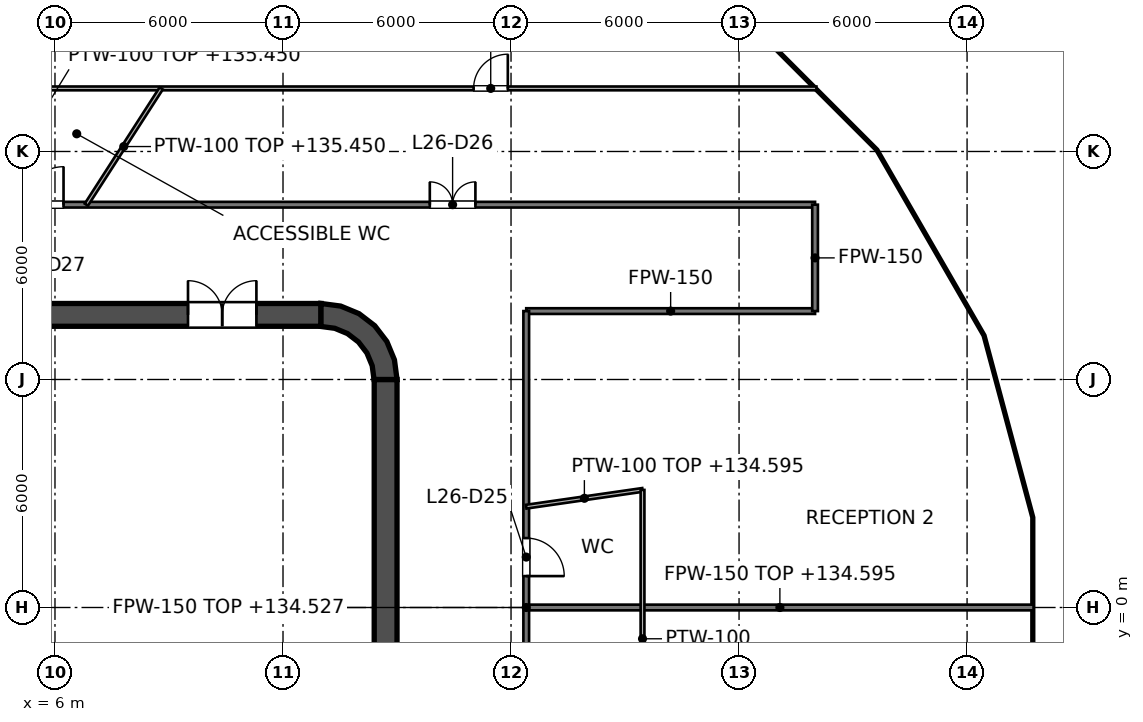
"""IFC4 building model, lengths in metres.
Left out: names, types, materials, properties, quantities, classifications, styles, units other than length and angle.
Written with IfcOpenShell. Run it as: python <this file> out.ifc"""

import sys

from ifc_helpers import new_model, si_unit, direction, frame, frame_2d, origin, place, context, subcontext, project, spatial, polyline, rectangle, outline, extrude, element, fill, save


model = new_model("IFC4")
c1 = context("Model", 3, precision=1e-05, world=origin(), true_north=direction((0.0, 1.0)))
c2 = subcontext(c1, "Body", "Model", "MODEL_VIEW")
j1 = project(units=[si_unit("LENGTHUNIT", "METRE"), si_unit("PLANEANGLEUNIT", "RADIAN")], contexts=[c1])
p1 = place(None, origin())
s1 = spatial("IfcSite", under=j1, at=p1, CompositionType="ELEMENT")
p2 = place(p1, origin())
s2 = spatial("IfcBuilding", under=s1, at=p2, CompositionType="ELEMENT")
p3 = place(p2, frame((0.0, 0.0, 131.4)))
s3 = spatial("IfcBuildingStorey", under=s2, at=p3, CompositionType="ELEMENT", Elevation=131.4)
p4 = place(p3, frame((-13.0, 7.7, 0.0), z_axis=(0.0, 0.0, 1.0), x_axis=(1.0, 0.0, 0.0)))
e1 = element("IfcWall", 1, at=p4, inside=s3, PredefinedType="SHEAR", context=c2, shape_type="SweptSolid", body=[
    extrude(rectangle(XDim=26.0, YDim=0.6, at=frame_2d((13.0, 0.0))), origin(), (0.0, 0.0, 1.0), 4.2),
])
p5 = place(p4, frame((1.7, 0.0, 0.0)))
e2 = element("IfcOpeningElement", 2, at=p5, cuts=e1, PredefinedType="OPENING", context=c2, shape_type="SweptSolid", body=[
    extrude(rectangle(XDim=1.8, YDim=2.1, at=frame_2d((0.9, 1.05))), frame((0.0, 0.3, 0.0), z_axis=(0.0, -1.0, 0.0), x_axis=(1.0, 0.0, 0.0)), (0.0, 0.0, 1.0), 0.6),
])
p6 = place(p4, frame((22.5, 0.0, 0.0)))
e3 = element("IfcOpeningElement", 3, at=p6, cuts=e1, PredefinedType="OPENING", context=c2, shape_type="SweptSolid", body=[
    extrude(rectangle(XDim=1.8, YDim=2.1, at=frame_2d((0.9, 1.05))), frame((0.0, 0.3, 0.0), z_axis=(0.0, -1.0, 0.0), x_axis=(1.0, 0.0, 0.0)), (0.0, 0.0, 1.0), 0.6),
])
p7 = place(p3, frame((14.7, -6.0, 0.0), z_axis=(0.0, 0.0, 1.0), x_axis=(0.0, 1.0, 0.0)))
e4 = element("IfcWall", 4, at=p7, inside=s3, PredefinedType="SHEAR", context=c2, shape_type="SweptSolid", body=[
    extrude(rectangle(XDim=12.0, YDim=0.6, at=frame_2d((6.0, 0.0))), origin(), (0.0, 0.0, 1.0), 4.2),
])
p8 = place(p3, origin())
e5 = element("IfcWall", 5, at=p8, inside=s3, PredefinedType="SHEAR", context=c2, shape_type="SweptSolid", body=[
    extrude(outline(polyline([(13.0, 8.0), (13.0, 7.395), (13.361, 7.347), (13.698, 7.208), (13.986, 6.986), (14.208, 6.698), (14.347, 6.361), (14.395, 6.0), (15.0, 6.0), (14.932, 6.518), (14.732, 7.0), (14.414, 7.414), (14.0, 7.732), (13.518, 7.932), (13.0, 8.0)])), origin(), (0.0, 0.0, 1.0), 4.2),
])
p9 = place(p3, frame((9.0, 4.1, 0.0), z_axis=(0.0, 0.0, 1.0), x_axis=(0.0, 1.0, 0.0)))
e6 = element("IfcWall", 6, at=p9, inside=s3, PredefinedType="SOLIDWALL", context=c2, shape_type="SweptSolid", body=[
    extrude(rectangle(XDim=2.5, YDim=0.25, at=frame_2d((1.25, 0.0))), origin(), (0.0, 0.0, 1.0), 4.05),
])
p10 = place(p9, frame((0.65, 0.0, 0.0)))
e7 = element("IfcOpeningElement", 7, at=p10, cuts=e6, PredefinedType="OPENING", context=c2, shape_type="SweptSolid", body=[
    extrude(rectangle(XDim=1.2, YDim=2.1, at=frame_2d((0.6, 1.05))), frame((0.0, 0.125, 0.0), z_axis=(0.0, -1.0, 0.0), x_axis=(1.0, 0.0, 0.0)), (0.0, 0.0, 1.0), 0.25),
])
p11 = place(p3, frame((-9.125, 7.0, 0.0), z_axis=(0.0, 0.0, 1.0), x_axis=(1.0, 0.0, 0.0)))
e8 = element("IfcWall", 8, at=p11, inside=s3, PredefinedType="SOLIDWALL", context=c2, shape_type="SweptSolid", body=[
    extrude(rectangle(XDim=18.25, YDim=0.8, at=frame_2d((9.125, 0.0))), origin(), (0.0, 0.0, 1.0), 4.05),
])
p12 = place(p3, frame((0.775, 1.525, 0.0), z_axis=(0.0, 0.0, 1.0), x_axis=(1.0, 0.0, 0.0)))
e9 = element("IfcWall", 9, at=p12, inside=s3, PredefinedType="PARTITIONING", context=c2, shape_type="SweptSolid", body=[
    extrude(rectangle(XDim=8.35, YDim=0.25, at=frame_2d((4.175, 0.0))), origin(), (0.0, 0.0, 1.0), 4.05),
])
p13 = place(p12, frame((1.413, 0.0, 0.0)))
e10 = element("IfcOpeningElement", 10, at=p13, cuts=e9, PredefinedType="OPENING", context=c2, shape_type="SweptSolid", body=[
    extrude(rectangle(XDim=1.0, YDim=2.1, at=frame_2d((0.5, 1.05))), frame((0.0, 0.125, 0.0), z_axis=(0.0, -1.0, 0.0), x_axis=(1.0, 0.0, 0.0)), (0.0, 0.0, 1.0), 0.25),
])
p14 = place(p12, frame((5.387, 0.0, 0.0)))
e11 = element("IfcOpeningElement", 11, at=p14, cuts=e9, PredefinedType="OPENING", context=c2, shape_type="SweptSolid", body=[
    extrude(rectangle(XDim=1.0, YDim=2.1, at=frame_2d((0.5, 1.05))), frame((0.0, 0.125, 0.0), z_axis=(0.0, -1.0, 0.0), x_axis=(1.0, 0.0, 0.0)), (0.0, 0.0, 1.0), 0.25),
])
p15 = place(p3, frame((0.775, 3.975, 0.0), z_axis=(0.0, 0.0, 1.0), x_axis=(1.0, 0.0, 0.0)))
e12 = element("IfcWall", 12, at=p15, inside=s3, PredefinedType="SOLIDWALL", context=c2, shape_type="SweptSolid", body=[
    extrude(rectangle(XDim=8.35, YDim=0.25, at=frame_2d((4.175, 0.0))), origin(), (0.0, 0.0, 1.0), 4.05),
])
p16 = place(p3, frame((9.0, 1.65, 0.0), z_axis=(0.0, 0.0, 1.0), x_axis=(0.0, 1.0, 0.0)))
e13 = element("IfcWall", 13, at=p16, inside=s3, PredefinedType="PARTITIONING", context=c2, shape_type="SweptSolid", body=[
    extrude(rectangle(XDim=2.2, YDim=0.25, at=frame_2d((1.1, 0.0))), origin(), (0.0, 0.0, 1.0), 4.05),
])
p17 = place(p3, frame((11.8, -7.4, 0.0), z_axis=(0.0, 0.0, 1.0), x_axis=(0.0, 1.0, 0.0)))
e14 = element("IfcWall", 14, at=p17, inside=s3, PredefinedType="SOLIDWALL", context=c2, shape_type="SweptSolid", body=[
    extrude(rectangle(XDim=14.8, YDim=0.4, at=frame_2d((7.4, 0.0))), origin(), (0.0, 0.0, 1.0), 4.05),
])
p18 = place(p17, frame((11.2, 0.0, 0.0)))
e15 = element("IfcOpeningElement", 15, at=p18, cuts=e14, PredefinedType="OPENING", context=c2, shape_type="SweptSolid", body=[
    extrude(rectangle(XDim=1.1, YDim=2.1, at=frame_2d((0.55, 1.05))), frame((0.0, 0.2, 0.0), z_axis=(0.0, -1.0, 0.0), x_axis=(1.0, 0.0, 0.0)), (0.0, 0.0, 1.0), 0.4),
])
p19 = place(p17, frame((8.3, 0.0, 0.0)))
e16 = element("IfcOpeningElement", 16, at=p19, cuts=e14, PredefinedType="OPENING", context=c2, shape_type="SweptSolid", body=[
    extrude(rectangle(XDim=1.1, YDim=2.1, at=frame_2d((0.55, 1.05))), frame((0.0, 0.2, 0.0), z_axis=(0.0, -1.0, 0.0), x_axis=(1.0, 0.0, 0.0)), (0.0, 0.0, 1.0), 0.4),
])
p20 = place(p17, frame((5.4, 0.0, 0.0)))
e17 = element("IfcOpeningElement", 17, at=p20, cuts=e14, PredefinedType="OPENING", context=c2, shape_type="SweptSolid", body=[
    extrude(rectangle(XDim=1.1, YDim=2.1, at=frame_2d((0.55, 1.05))), frame((0.0, 0.2, 0.0), z_axis=(0.0, -1.0, 0.0), x_axis=(1.0, 0.0, 0.0)), (0.0, 0.0, 1.0), 0.4),
])
p21 = place(p17, frame((13.552, 0.0, 0.0)))
e18 = element("IfcOpeningElement", 18, at=p21, cuts=e14, PredefinedType="OPENING", context=c2, shape_type="SweptSolid", body=[
    extrude(rectangle(XDim=0.9, YDim=2.1, at=frame_2d((0.45, 1.05))), frame((0.0, 0.2, 0.0), z_axis=(0.0, -1.0, 0.0), x_axis=(1.0, 0.0, 0.0)), (0.0, 0.0, 1.0), 0.4),
])
p22 = place(p17, frame((0.347, 0.0, 0.0)))
e19 = element("IfcOpeningElement", 19, at=p22, cuts=e14, PredefinedType="OPENING", context=c2, shape_type="SweptSolid", body=[
    extrude(rectangle(XDim=0.9, YDim=2.1, at=frame_2d((0.45, 1.05))), frame((0.0, 0.2, 0.0), z_axis=(0.0, -1.0, 0.0), x_axis=(1.0, 0.0, 0.0)), (0.0, 0.0, 1.0), 0.4),
])
e20 = element("IfcWall", 20, at=p8, inside=s3, PredefinedType="SOLIDWALL", context=c2, shape_type="SweptSolid", body=[
    extrude(outline(polyline([(12.0, -5.675), (12.0, -5.925), (14.15, -5.925), (14.4, -5.925), (14.4, -5.675), (14.4, -3.025), (14.4, -2.775), (14.4, -0.125), (14.4, 0.125), (14.4, 2.775), (14.4, 3.025), (14.4, 5.675), (14.4, 5.925), (14.15, 5.925), (12.0, 5.925), (12.0, 5.675), (14.15, 5.675), (14.15, 3.025), (12.0, 3.025), (12.0, 2.775), (14.15, 2.775), (14.15, 0.125), (12.0, 0.125), (12.0, -0.125), (14.15, -0.125), (14.15, -2.775), (12.0, -2.775), (12.0, -3.025), (14.15, -3.025), (14.15, -5.675), (12.0, -5.675)])), origin(), (0.0, 0.0, 1.0), 4.05),
])
p23 = place(p3, frame((18.4, 0.0, 0.0), z_axis=(0.0, 0.0, 1.0), x_axis=(1.0, 0.0, 0.0)))
e21 = element("IfcWall", 21, at=p23, inside=s3, PredefinedType="PARTITIONING", context=c2, shape_type="SweptSolid", body=[
    extrude(rectangle(XDim=13.349, YDim=0.15, at=frame_2d((6.675, 0.0))), origin(), (0.0, 0.0, 1.0), 3.195),
])
p24 = place(p3, frame((18.4, 7.8, 0.0), z_axis=(0.0, 0.0, 1.0), x_axis=(1.0, 0.0, 0.0)))
e22 = element("IfcWall", 22, at=p24, inside=s3, PredefinedType="PARTITIONING", context=c2, shape_type="SweptSolid", body=[
    extrude(rectangle(XDim=7.6, YDim=0.15, at=frame_2d((3.8, 0.0))), origin(), (0.0, 0.0, 1.0), 3.276),
])
p25 = place(p3, frame((-26.0, 10.6, 0.0), z_axis=(0.0, 0.0, 1.0), x_axis=(1.0, 0.0, 0.0)))
e23 = element("IfcWall", 23, at=p25, inside=s3, PredefinedType="PARTITIONING", context=c2, shape_type="SweptSolid", body=[
    extrude(rectangle(XDim=52.0, YDim=0.15, at=frame_2d((26.0, 0.0))), origin(), (0.0, 0.0, 1.0), 3.127),
])
p26 = place(p25, frame((41.863, 0.0, 0.0)))
e24 = element("IfcOpeningElement", 24, at=p26, cuts=e23, PredefinedType="OPENING", context=c2, shape_type="SweptSolid", body=[
    extrude(rectangle(XDim=1.2, YDim=2.1, at=frame_2d((0.6, 1.05))), frame((0.0, 0.075, 0.0), z_axis=(0.0, -1.0, 0.0), x_axis=(1.0, 0.0, 0.0)), (0.0, 0.0, 1.0), 0.15),
])
p27 = place(p25, frame((31.225, 0.0, 0.0)))
e25 = element("IfcOpeningElement", 25, at=p27, cuts=e23, PredefinedType="OPENING", context=c2, shape_type="SweptSolid", body=[
    extrude(rectangle(XDim=1.0, YDim=2.1, at=frame_2d((0.5, 1.05))), frame((0.0, 0.075, 0.0), z_axis=(0.0, -1.0, 0.0), x_axis=(1.0, 0.0, 0.0)), (0.0, 0.0, 1.0), 0.15),
])
p28 = place(p25, frame((29.234, 0.0, 0.0)))
e26 = element("IfcOpeningElement", 26, at=p28, cuts=e23, PredefinedType="OPENING", context=c2, shape_type="SweptSolid", body=[
    extrude(rectangle(XDim=1.0, YDim=2.1, at=frame_2d((0.5, 1.05))), frame((0.0, 0.075, 0.0), z_axis=(0.0, -1.0, 0.0), x_axis=(1.0, 0.0, 0.0)), (0.0, 0.0, 1.0), 0.15),
])
p29 = place(p25, frame((25.5, 0.0, 0.0)))
e27 = element("IfcOpeningElement", 27, at=p29, cuts=e23, PredefinedType="OPENING", context=c2, shape_type="SweptSolid", body=[
    extrude(rectangle(XDim=1.0, YDim=2.1, at=frame_2d((0.5, 1.05))), frame((0.0, 0.075, 0.0), z_axis=(0.0, -1.0, 0.0), x_axis=(1.0, 0.0, 0.0)), (0.0, 0.0, 1.0), 0.15),
])
p30 = place(p25, frame((14.83, 0.0, 0.0)))
e28 = element("IfcOpeningElement", 28, at=p30, cuts=e23, PredefinedType="OPENING", context=c2, shape_type="SweptSolid", body=[
    extrude(rectangle(XDim=1.0, YDim=2.1, at=frame_2d((0.5, 1.05))), frame((0.0, 0.075, 0.0), z_axis=(0.0, -1.0, 0.0), x_axis=(1.0, 0.0, 0.0)), (0.0, 0.0, 1.0), 0.15),
])
p31 = place(p25, frame((3.249, 0.0, 0.0)))
e29 = element("IfcOpeningElement", 29, at=p31, cuts=e23, PredefinedType="OPENING", context=c2, shape_type="SweptSolid", body=[
    extrude(rectangle(XDim=1.0, YDim=2.1, at=frame_2d((0.5, 1.05))), frame((0.0, 0.075, 0.0), z_axis=(0.0, -1.0, 0.0), x_axis=(1.0, 0.0, 0.0)), (0.0, 0.0, 1.0), 0.15),
])
p32 = place(p3, frame((2.84, 10.6, 0.0), z_axis=(0.0, 0.0, 1.0), x_axis=(0.258833974298, 0.9659218259, 0.0)))
e30 = element("IfcWall", 30, at=p32, inside=s3, PredefinedType="PARTITIONING", context=c2, shape_type="SweptSolid", body=[
    extrude(rectangle(XDim=13.464, YDim=0.15, at=frame_2d((6.732, 0.0))), origin(), (0.0, 0.0, 1.0), 3.502),
])
p33 = place(p3, frame((26.0, 7.8, 0.0), z_axis=(0.0, 0.0, 1.0), x_axis=(0.0, 1.0, 0.0)))
e31 = element("IfcWall", 31, at=p33, inside=s3, PredefinedType="PARTITIONING", context=c2, shape_type="SweptSolid", body=[
    extrude(rectangle(XDim=2.8, YDim=0.15, at=frame_2d((1.4, 0.0))), origin(), (0.0, 0.0, 1.0), 3.276),
])
p34 = place(p3, frame((18.4, -7.8, 0.0), z_axis=(0.0, 0.0, 1.0), x_axis=(0.0, 1.0, 0.0)))
e32 = element("IfcWall", 32, at=p34, inside=s3, PredefinedType="PARTITIONING", context=c2, shape_type="SweptSolid", body=[
    extrude(rectangle(XDim=15.6, YDim=0.15, at=frame_2d((7.8, 0.0))), origin(), (0.0, 0.0, 1.0), 3.127),
])
p35 = place(p34, frame((8.626, 0.0, 0.0)))
e33 = element("IfcOpeningElement", 33, at=p35, cuts=e32, PredefinedType="OPENING", context=c2, shape_type="SweptSolid", body=[
    extrude(rectangle(XDim=1.0, YDim=2.1, at=frame_2d((0.5, 1.05))), frame((0.0, 0.075, 0.0), z_axis=(0.0, -1.0, 0.0), x_axis=(1.0, 0.0, 0.0)), (0.0, 0.0, 1.0), 0.15),
])
p36 = place(p3, frame((-23.659, 13.66, 0.0), z_axis=(0.0, 0.0, 1.0), x_axis=(1.0, 0.0, 0.0)))
e34 = element("IfcWall", 34, at=p36, inside=s3, PredefinedType="PARTITIONING", context=c2, shape_type="SweptSolid", body=[
    extrude(rectangle(XDim=49.695, YDim=0.1, at=frame_2d((24.847, 0.0))), origin(), (0.0, 0.0, 1.0), 3.127),
])
p37 = place(p36, frame((40.675, 0.0, 0.0)))
e35 = element("IfcOpeningElement", 35, at=p37, cuts=e34, PredefinedType="OPENING", context=c2, shape_type="SweptSolid", body=[
    extrude(rectangle(XDim=0.9, YDim=2.1, at=frame_2d((0.45, 1.05))), frame((0.0, 0.05, 0.0), z_axis=(0.0, -1.0, 0.0), x_axis=(1.0, 0.0, 0.0)), (0.0, 0.0, 1.0), 0.1),
])
p38 = place(p36, frame((9.049, 0.0, 0.0)))
e36 = element("IfcOpeningElement", 36, at=p38, cuts=e34, PredefinedType="OPENING", context=c2, shape_type="SweptSolid", body=[
    extrude(rectangle(XDim=1.8, YDim=2.1, at=frame_2d((0.9, 1.05))), frame((0.0, 0.05, 0.0), z_axis=(0.0, -1.0, 0.0), x_axis=(1.0, 0.0, 0.0)), (0.0, 0.0, 1.0), 0.1),
])
p39 = place(p3, frame((18.4, 2.653, 0.0), z_axis=(0.0, 0.0, 1.0), x_axis=(0.989778203896, 0.142615241442, 0.0)))
e37 = element("IfcWall", 37, at=p39, inside=s3, PredefinedType="PARTITIONING", context=c2, shape_type="SweptSolid", body=[
    extrude(rectangle(XDim=3.092, YDim=0.1, at=frame_2d((1.546, 0.0))), origin(), (0.0, 0.0, 1.0), 3.195),
])
p40 = place(p3, frame((6.825, 10.6, 0.0), z_axis=(0.0, 0.0, 1.0), x_axis=(0.541330496355, 0.840809903436, 0.0)))
e38 = element("IfcWall", 38, at=p40, inside=s3, PredefinedType="PARTITIONING", context=c2, shape_type="SweptSolid", body=[
    extrude(rectangle(XDim=3.639, YDim=0.1, at=frame_2d((1.82, 0.0))), origin(), (0.0, 0.0, 1.0), 4.05),
])
p41 = place(p3, frame((21.46, -4.74, 0.0), z_axis=(0.0, 0.0, 1.0), x_axis=(0.0, 1.0, 0.0)))
e39 = element("IfcWall", 39, at=p41, inside=s3, PredefinedType="PARTITIONING", context=c2, shape_type="SweptSolid", body=[
    extrude(rectangle(XDim=7.834, YDim=0.1, at=frame_2d((3.917, 0.0))), origin(), (0.0, 0.0, 1.0), 3.127),
])
p42 = place(p18, origin())
e40 = element("IfcDoor", 40, at=p42, inside=s3, OperationType="DOUBLE_DOOR_SLIDING", PredefinedType="DOOR", context=c2, shape_type="SweptSolid", body=[
    extrude(rectangle(XDim=1.1, YDim=2.1, at=frame_2d((0.55, 1.05))), frame((0.0, 0.025, 0.0), z_axis=(0.0, -1.0, 0.0), x_axis=(1.0, 0.0, 0.0)), (0.0, 0.0, 1.0), 0.05),
])
fill(e15, e40)
p43 = place(p19, origin())
e41 = element("IfcDoor", 41, at=p43, inside=s3, OperationType="DOUBLE_DOOR_SLIDING", PredefinedType="DOOR", context=c2, shape_type="SweptSolid", body=[
    extrude(rectangle(XDim=1.1, YDim=2.1, at=frame_2d((0.55, 1.05))), frame((0.0, 0.025, 0.0), z_axis=(0.0, -1.0, 0.0), x_axis=(1.0, 0.0, 0.0)), (0.0, 0.0, 1.0), 0.05),
])
fill(e16, e41)
p44 = place(p20, origin())
e42 = element("IfcDoor", 42, at=p44, inside=s3, OperationType="DOUBLE_DOOR_SLIDING", PredefinedType="DOOR", context=c2, shape_type="SweptSolid", body=[
    extrude(rectangle(XDim=1.1, YDim=2.1, at=frame_2d((0.55, 1.05))), frame((0.0, 0.025, 0.0), z_axis=(0.0, -1.0, 0.0), x_axis=(1.0, 0.0, 0.0)), (0.0, 0.0, 1.0), 0.05),
])
fill(e17, e42)
p45 = place(p10, origin())
e43 = element("IfcDoor", 43, at=p45, inside=s3, OperationType="SINGLE_SWING_LEFT", PredefinedType="DOOR", context=c2, shape_type="SweptSolid", body=[
    extrude(rectangle(XDim=1.2, YDim=2.1, at=frame_2d((0.6, 1.05))), frame((0.0, 0.025, 0.0), z_axis=(0.0, -1.0, 0.0), x_axis=(1.0, 0.0, 0.0)), (0.0, 0.0, 1.0), 0.05),
])
fill(e7, e43)
p46 = place(p14, origin())
e44 = element("IfcDoor", 44, at=p46, inside=s3, OperationType="SINGLE_SWING_LEFT", PredefinedType="DOOR", context=c2, shape_type="SweptSolid", body=[
    extrude(rectangle(XDim=1.0, YDim=2.1, at=frame_2d((0.5, 1.05))), frame((0.0, 0.025, 0.0), z_axis=(0.0, -1.0, 0.0), x_axis=(1.0, 0.0, 0.0)), (0.0, 0.0, 1.0), 0.05),
])
fill(e11, e44)
p47 = place(p21, origin())
e45 = element("IfcDoor", 45, at=p47, inside=s3, OperationType="SINGLE_SWING_RIGHT", PredefinedType="DOOR", context=c2, shape_type="SweptSolid", body=[
    extrude(rectangle(XDim=0.9, YDim=2.1, at=frame_2d((0.45, 1.05))), frame((0.0, 0.025, 0.0), z_axis=(0.0, -1.0, 0.0), x_axis=(1.0, 0.0, 0.0)), (0.0, 0.0, 1.0), 0.05),
])
fill(e18, e45)
p48 = place(p6, origin())
e46 = element("IfcDoor", 46, at=p48, inside=s3, OperationType="DOUBLE_DOOR_SINGLE_SWING", PredefinedType="DOOR", context=c2, shape_type="SweptSolid", body=[
    extrude(rectangle(XDim=1.8, YDim=2.1, at=frame_2d((0.9, 1.05))), frame((0.0, 0.025, 0.0), z_axis=(0.0, -1.0, 0.0), x_axis=(1.0, 0.0, 0.0)), (0.0, 0.0, 1.0), 0.05),
])
fill(e3, e46)
p49 = place(p35, origin())
e47 = element("IfcDoor", 47, at=p49, inside=s3, OperationType="SINGLE_SWING_LEFT", PredefinedType="DOOR", context=c2, shape_type="SweptSolid", body=[
    extrude(rectangle(XDim=1.0, YDim=2.1, at=frame_2d((0.5, 1.05))), frame((0.0, 0.025, 0.0), z_axis=(0.0, -1.0, 0.0), x_axis=(1.0, 0.0, 0.0)), (0.0, 0.0, 1.0), 0.05),
])
fill(e33, e47)
p50 = place(p26, origin())
e48 = element("IfcDoor", 48, at=p50, inside=s3, OperationType="DOUBLE_DOOR_SINGLE_SWING", PredefinedType="DOOR", context=c2, shape_type="SweptSolid", body=[
    extrude(rectangle(XDim=1.2, YDim=2.1, at=frame_2d((0.6, 1.05))), frame((0.0, 0.025, 0.0), z_axis=(0.0, -1.0, 0.0), x_axis=(1.0, 0.0, 0.0)), (0.0, 0.0, 1.0), 0.05),
])
fill(e24, e48)
p51 = place(p27, origin())
e49 = element("IfcDoor", 49, at=p51, inside=s3, OperationType="SINGLE_SWING_RIGHT", PredefinedType="DOOR", context=c2, shape_type="SweptSolid", body=[
    extrude(rectangle(XDim=1.0, YDim=2.1, at=frame_2d((0.5, 1.05))), frame((0.0, 0.025, 0.0), z_axis=(0.0, -1.0, 0.0), x_axis=(1.0, 0.0, 0.0)), (0.0, 0.0, 1.0), 0.05),
])
fill(e25, e49)
p52 = place(p37, origin())
e50 = element("IfcDoor", 50, at=p52, inside=s3, OperationType="SINGLE_SWING_RIGHT", PredefinedType="DOOR", context=c2, shape_type="SweptSolid", body=[
    extrude(rectangle(XDim=0.9, YDim=2.1, at=frame_2d((0.45, 1.05))), frame((0.0, 0.025, 0.0), z_axis=(0.0, -1.0, 0.0), x_axis=(1.0, 0.0, 0.0)), (0.0, 0.0, 1.0), 0.05),
])
fill(e35, e50)
save(model, sys.argv[1])
